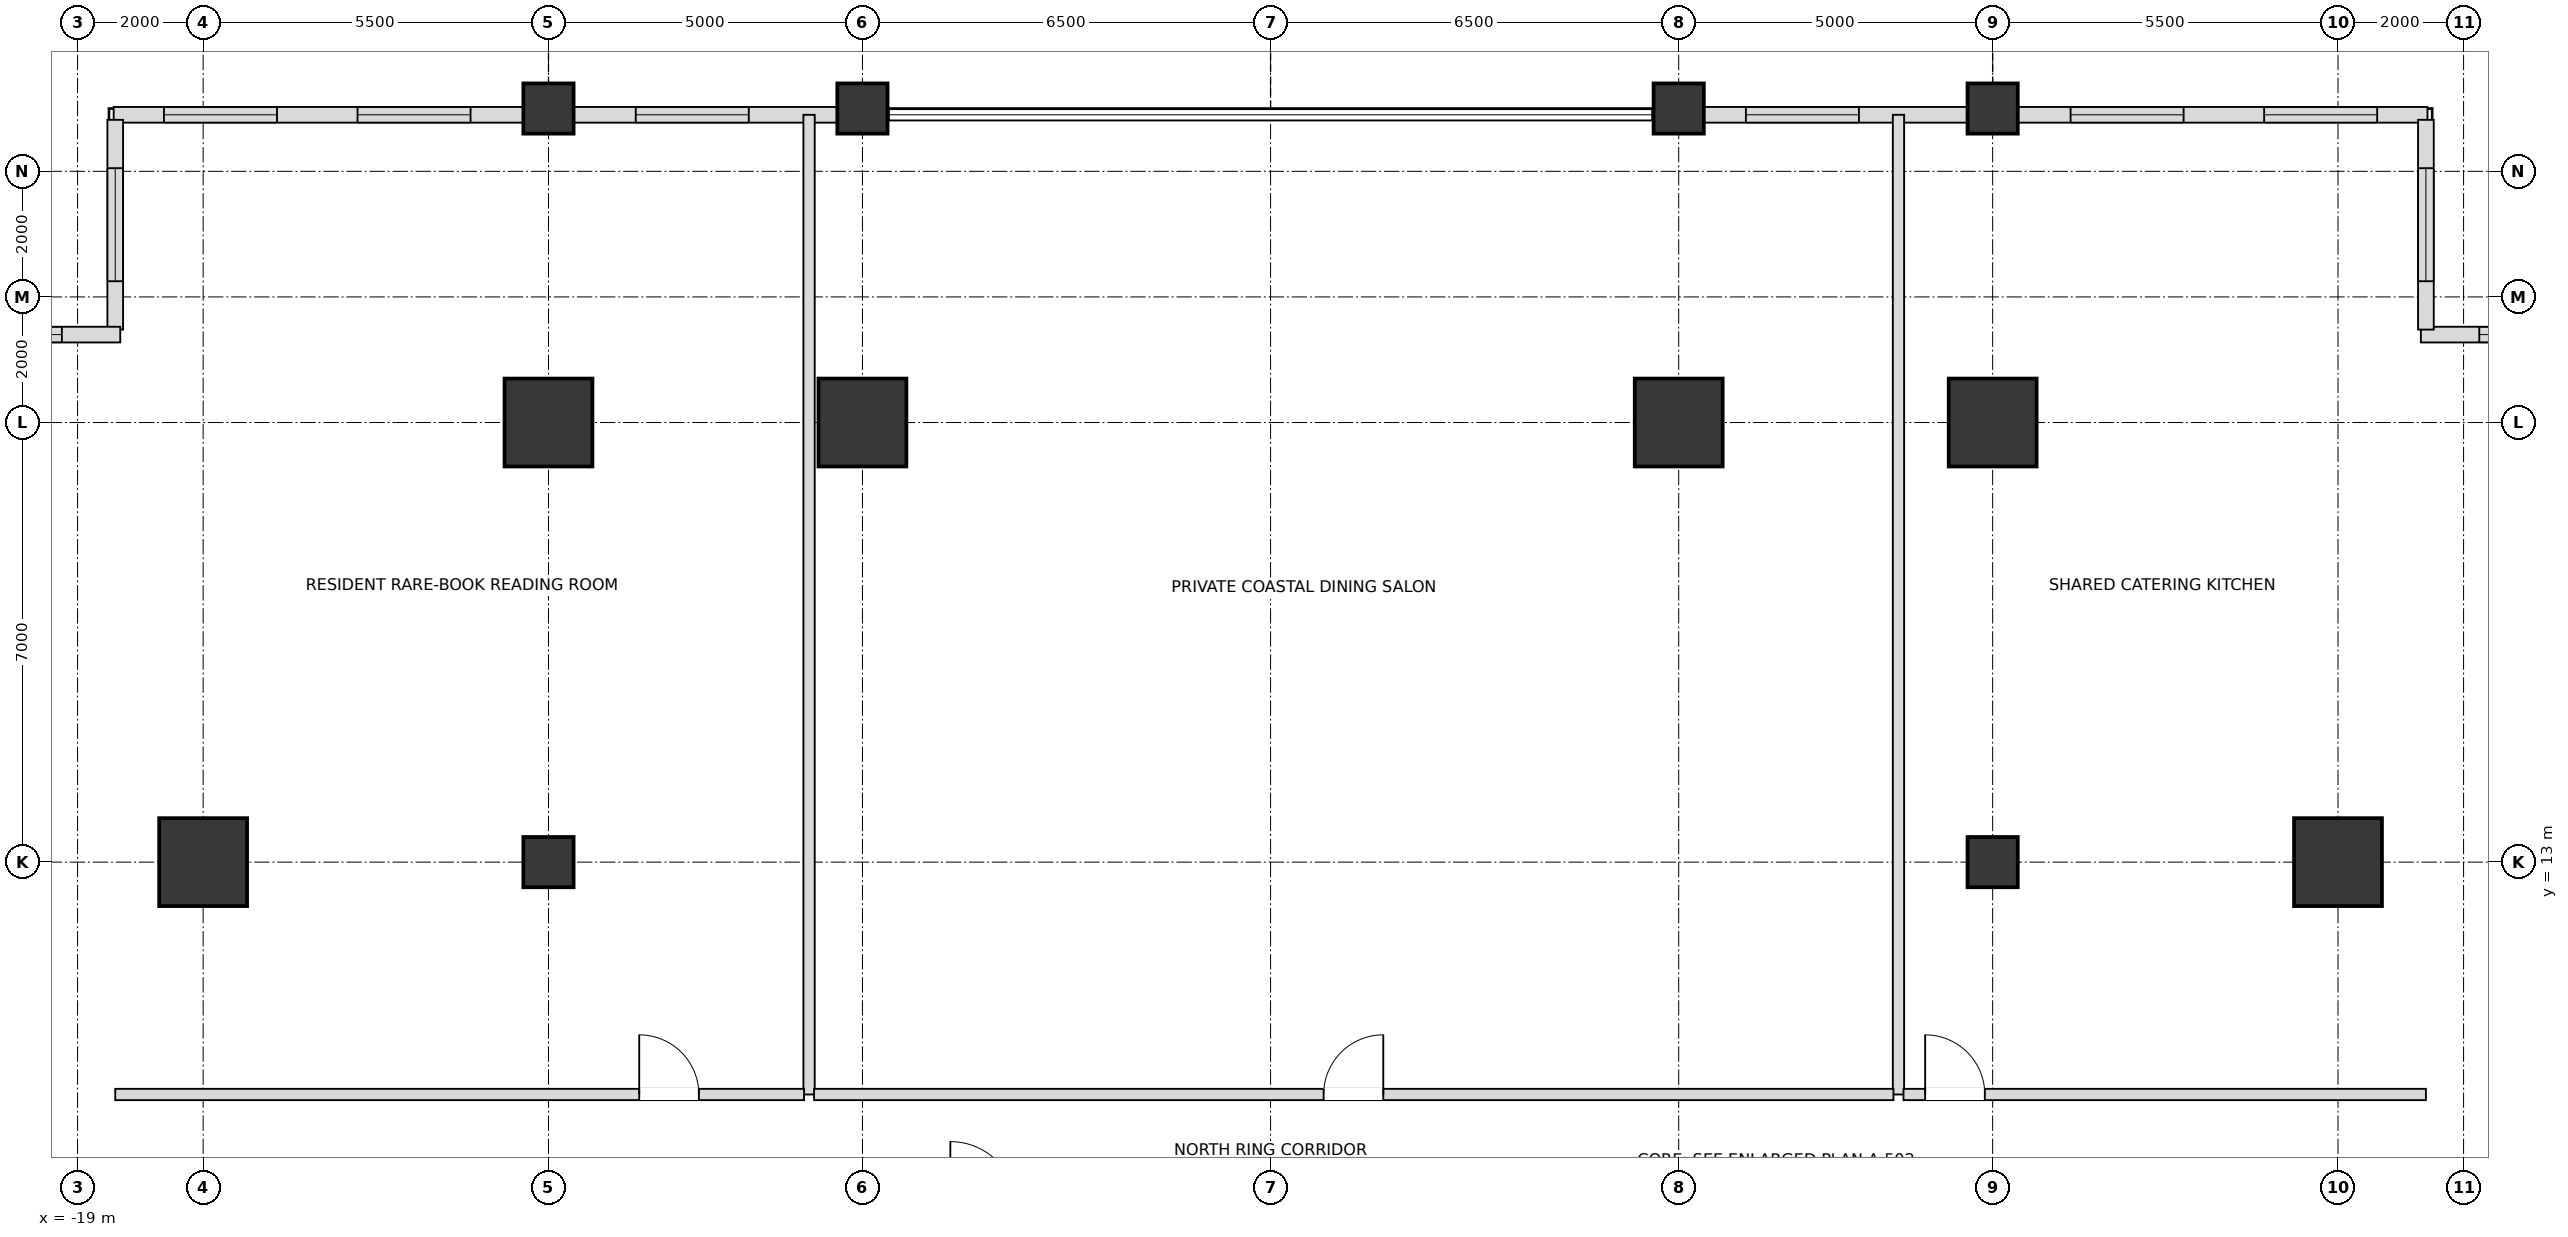
"""IFC4 building model, lengths in metres.
Left out: names, types, materials, properties, quantities, classifications, styles, units other than length and angle.
Written with IfcOpenShell. Run it as: python <this file> out.ifc"""

import sys

from ifc_helpers import new_model, si_unit, direction, frame, frame_2d, origin, origin_2d, place, context, subcontext, project, spatial, rectangle, extrude, element, fill, save


model = new_model("IFC4")
c1 = context("Model", 3, precision=1e-05, world=origin(), true_north=direction((0.0, 1.0)))
c2 = subcontext(c1, "Body", "Model", "MODEL_VIEW")
j1 = project(units=[si_unit("LENGTHUNIT", "METRE"), si_unit("PLANEANGLEUNIT", "RADIAN")], contexts=[c1])
p1 = place(None, origin())
s1 = spatial("IfcSite", under=j1, at=p1, CompositionType="ELEMENT")
p2 = place(p1, origin())
s2 = spatial("IfcBuilding", under=s1, at=p2, CompositionType="ELEMENT")
p3 = place(p2, frame((0.0, 0.0, 72.0)))
s3 = spatial("IfcBuildingStorey", under=s2, at=p3, CompositionType="ELEMENT", Elevation=72.0)
for number, where, z_axis, x_axis in (
    (1, (17.0, 13.0, 0.0), (0.0, 0.0, 1.0), (1.0, 0.0, 0.0)),
    (2, (11.5, 20.0, 0.0), (0.0, 0.0, 1.0), (1.0, 0.0, 0.0)),
    (3, (6.5, 20.0, 0.0), (0.0, 0.0, 1.0), (1.0, 0.0, 0.0)),
    (4, (-6.5, 20.0, 0.0), (0.0, 0.0, 1.0), (1.0, 0.0, 0.0)),
    (5, (-11.5, 20.0, 0.0), (0.0, 0.0, 1.0), (1.0, 0.0, 0.0)),
    (6, (-17.0, 13.0, 0.0), (0.0, 0.0, 1.0), (1.0, 0.0, 0.0)),
):
    element("IfcColumn", number, at=place(p3, frame(where, z_axis=z_axis, x_axis=x_axis)), inside=s3, PredefinedType="USERDEFINED", context=c2, shape_type="SweptSolid", body=[
        extrude(rectangle(XDim=1.4, YDim=1.4, at=origin_2d()), origin(), (0.0, 0.0, 1.0), 3.6),
    ])
for number, where, z_axis, x_axis in (
    (7, (-11.5, 13.0, 0.0), (0.0, 0.0, 1.0), (1.0, 0.0, 0.0)),
    (8, (11.5, 13.0, 0.0), (0.0, 0.0, 1.0), (1.0, 0.0, 0.0)),
    (9, (-11.5, 25.0, 0.0), (0.0, 0.0, 1.0), (1.0, 0.0, 0.0)),
    (10, (-6.5, 25.0, 0.0), (0.0, 0.0, 1.0), (1.0, 0.0, 0.0)),
    (11, (6.5, 25.0, 0.0), (0.0, 0.0, 1.0), (1.0, 0.0, 0.0)),
    (12, (11.5, 25.0, 0.0), (0.0, 0.0, 1.0), (1.0, 0.0, 0.0)),
):
    element("IfcColumn", number, at=place(p3, frame(where, z_axis=z_axis, x_axis=x_axis)), inside=s3, PredefinedType="COLUMN", context=c2, shape_type="SweptSolid", body=[
        extrude(rectangle(XDim=0.8, YDim=0.8, at=origin_2d()), origin(), (0.0, 0.0, 1.0), 3.6),
    ])
p4 = place(p3, frame((18.425, 24.9, 0.0), z_axis=(0.0, 0.0, 1.0), x_axis=(-1.0, 0.0, 0.0)))
e13 = element("IfcWall", 13, at=p4, inside=s3, PredefinedType="SOLIDWALL", context=c2, shape_type="SweptSolid", body=[
    extrude(rectangle(XDim=6.53, YDim=0.25, at=frame_2d((3.265, 0.0))), origin(), (0.0, 0.0, 1.0), 2.736),
])
p5 = place(p4, frame((0.801, 0.0, 0.72)))
e14 = element("IfcOpeningElement", 14, at=p5, cuts=e13, PredefinedType="OPENING", context=c2, shape_type="SweptSolid", body=[
    extrude(rectangle(XDim=1.8, YDim=1.68, at=frame_2d((0.9, 0.84))), frame((0.0, 0.135, 0.0), z_axis=(0.0, -1.0, 0.0), x_axis=(1.0, 0.0, 0.0)), (0.0, 0.0, 1.0), 0.27),
])
p6 = place(p4, frame((3.884, 0.0, 0.72)))
e15 = element("IfcOpeningElement", 15, at=p6, cuts=e13, PredefinedType="OPENING", context=c2, shape_type="SweptSolid", body=[
    extrude(rectangle(XDim=1.8, YDim=1.68, at=frame_2d((0.9, 0.84))), frame((0.0, 0.135, 0.0), z_axis=(0.0, -1.0, 0.0), x_axis=(1.0, 0.0, 0.0)), (0.0, 0.0, 1.0), 0.27),
])
p7 = place(p3, frame((11.105, 24.9, 0.0), z_axis=(0.0, 0.0, 1.0), x_axis=(-1.0, 0.0, 0.0)))
e16 = element("IfcWall", 16, at=p7, inside=s3, PredefinedType="SOLIDWALL", context=c2, shape_type="SweptSolid", body=[
    extrude(rectangle(XDim=4.21, YDim=0.25, at=frame_2d((2.105, 0.0))), origin(), (0.0, 0.0, 1.0), 2.736),
])
p8 = place(p7, frame((1.735, 0.0, 0.72)))
e17 = element("IfcOpeningElement", 17, at=p8, cuts=e16, PredefinedType="OPENING", context=c2, shape_type="SweptSolid", body=[
    extrude(rectangle(XDim=1.8, YDim=1.68, at=frame_2d((0.9, 0.84))), frame((0.0, 0.135, 0.0), z_axis=(0.0, -1.0, 0.0), x_axis=(1.0, 0.0, 0.0)), (0.0, 0.0, 1.0), 0.27),
])
p9 = place(p3, frame((-6.895, 24.9, 0.0), z_axis=(0.0, 0.0, 1.0), x_axis=(-1.0, 0.0, 0.0)))
e18 = element("IfcWall", 18, at=p9, inside=s3, PredefinedType="SOLIDWALL", context=c2, shape_type="SweptSolid", body=[
    extrude(rectangle(XDim=4.21, YDim=0.25, at=frame_2d((2.105, 0.0))), origin(), (0.0, 0.0, 1.0), 2.736),
])
p10 = place(p9, frame((1.415, 0.0, 0.72)))
e19 = element("IfcOpeningElement", 19, at=p10, cuts=e18, PredefinedType="OPENING", context=c2, shape_type="SweptSolid", body=[
    extrude(rectangle(XDim=1.8, YDim=1.68, at=frame_2d((0.9, 0.84))), frame((0.0, 0.135, 0.0), z_axis=(0.0, -1.0, 0.0), x_axis=(1.0, 0.0, 0.0)), (0.0, 0.0, 1.0), 0.27),
])
p11 = place(p3, frame((-11.895, 24.9, 0.0), z_axis=(0.0, 0.0, 1.0), x_axis=(-1.0, 0.0, 0.0)))
e20 = element("IfcWall", 20, at=p11, inside=s3, PredefinedType="SOLIDWALL", context=c2, shape_type="SweptSolid", body=[
    extrude(rectangle(XDim=6.53, YDim=0.25, at=frame_2d((3.265, 0.0))), origin(), (0.0, 0.0, 1.0), 2.736),
])
p12 = place(p11, frame((0.846, 0.0, 0.72)))
e21 = element("IfcOpeningElement", 21, at=p12, cuts=e20, PredefinedType="OPENING", context=c2, shape_type="SweptSolid", body=[
    extrude(rectangle(XDim=1.8, YDim=1.68, at=frame_2d((0.9, 0.84))), frame((0.0, 0.135, 0.0), z_axis=(0.0, -1.0, 0.0), x_axis=(1.0, 0.0, 0.0)), (0.0, 0.0, 1.0), 0.27),
])
p13 = place(p11, frame((3.929, 0.0, 0.72)))
e22 = element("IfcOpeningElement", 22, at=p13, cuts=e20, PredefinedType="OPENING", context=c2, shape_type="SweptSolid", body=[
    extrude(rectangle(XDim=1.8, YDim=1.68, at=frame_2d((0.9, 0.84))), frame((0.0, 0.135, 0.0), z_axis=(0.0, -1.0, 0.0), x_axis=(1.0, 0.0, 0.0)), (0.0, 0.0, 1.0), 0.27),
])
p14 = place(p3, frame((21.98, 21.4, 0.0), z_axis=(0.0, 0.0, 1.0), x_axis=(-1.0, 0.0, 0.0)))
e23 = element("IfcWall", 23, at=p14, inside=s3, PredefinedType="SOLIDWALL", context=c2, shape_type="SweptSolid", body=[
    extrude(rectangle(XDim=3.66, YDim=0.25, at=frame_2d((1.83, 0.0))), origin(), (0.0, 0.0, 1.0), 2.736),
])
p15 = place(p14, frame((0.93, 0.0, 0.72)))
e24 = element("IfcOpeningElement", 24, at=p15, cuts=e23, PredefinedType="OPENING", context=c2, shape_type="SweptSolid", body=[
    extrude(rectangle(XDim=1.8, YDim=1.68, at=frame_2d((0.9, 0.84))), frame((0.0, 0.135, 0.0), z_axis=(0.0, -1.0, 0.0), x_axis=(1.0, 0.0, 0.0)), (0.0, 0.0, 1.0), 0.27),
])
p16 = place(p3, frame((18.4, 21.48, 0.0), z_axis=(0.0, 0.0, 1.0), x_axis=(0.0, 1.0, 0.0)))
e25 = element("IfcWall", 25, at=p16, inside=s3, PredefinedType="SOLIDWALL", context=c2, shape_type="SweptSolid", body=[
    extrude(rectangle(XDim=3.34, YDim=0.25, at=frame_2d((1.67, 0.0))), origin(), (0.0, 0.0, 1.0), 2.736),
])
p17 = place(p16, frame((0.77, 0.0, 0.72)))
e26 = element("IfcOpeningElement", 26, at=p17, cuts=e25, PredefinedType="OPENING", context=c2, shape_type="SweptSolid", body=[
    extrude(rectangle(XDim=1.8, YDim=1.68, at=frame_2d((0.9, 0.84))), frame((0.0, 0.135, 0.0), z_axis=(0.0, -1.0, 0.0), x_axis=(1.0, 0.0, 0.0)), (0.0, 0.0, 1.0), 0.27),
])
p18 = place(p3, frame((-18.4, 24.82, 0.0), z_axis=(0.0, 0.0, 1.0), x_axis=(0.0, -1.0, 0.0)))
e27 = element("IfcWall", 27, at=p18, inside=s3, PredefinedType="SOLIDWALL", context=c2, shape_type="SweptSolid", body=[
    extrude(rectangle(XDim=3.34, YDim=0.25, at=frame_2d((1.67, 0.0))), origin(), (0.0, 0.0, 1.0), 2.736),
])
p19 = place(p18, frame((0.77, 0.0, 0.72)))
e28 = element("IfcOpeningElement", 28, at=p19, cuts=e27, PredefinedType="OPENING", context=c2, shape_type="SweptSolid", body=[
    extrude(rectangle(XDim=1.8, YDim=1.68, at=frame_2d((0.9, 0.84))), frame((0.0, 0.135, 0.0), z_axis=(0.0, -1.0, 0.0), x_axis=(1.0, 0.0, 0.0)), (0.0, 0.0, 1.0), 0.27),
])
p20 = place(p3, frame((-18.32, 21.4, 0.0), z_axis=(0.0, 0.0, 1.0), x_axis=(-1.0, 0.0, 0.0)))
e29 = element("IfcWall", 29, at=p20, inside=s3, PredefinedType="SOLIDWALL", context=c2, shape_type="SweptSolid", body=[
    extrude(rectangle(XDim=3.66, YDim=0.25, at=frame_2d((1.83, 0.0))), origin(), (0.0, 0.0, 1.0), 2.736),
])
p21 = place(p20, frame((0.93, 0.0, 0.72)))
e30 = element("IfcOpeningElement", 30, at=p21, cuts=e29, PredefinedType="OPENING", context=c2, shape_type="SweptSolid", body=[
    extrude(rectangle(XDim=1.8, YDim=1.68, at=frame_2d((0.9, 0.84))), frame((0.0, 0.135, 0.0), z_axis=(0.0, -1.0, 0.0), x_axis=(1.0, 0.0, 0.0)), (0.0, 0.0, 1.0), 0.27),
])
for number, where, z_axis, x_axis in (
    (31, (-7.35, 9.3, 0.0), (0.0, 0.0, 1.0), (0.0, 1.0, 0.0)),
    (32, (10.0, 9.3, 0.0), (0.0, 0.0, 1.0), (0.0, 1.0, 0.0)),
):
    element("IfcWall", number, at=place(p3, frame(where, z_axis=z_axis, x_axis=x_axis)), inside=s3, PredefinedType="PARTITIONING", context=c2, shape_type="SweptSolid", body=[
        extrude(rectangle(XDim=15.6, YDim=0.18, at=frame_2d((7.8, 0.0))), origin(), (0.0, 0.0, 1.0), 2.816),
    ])
p22 = place(p3, frame((-18.4, 9.3, 0.0), z_axis=(0.0, 0.0, 1.0), x_axis=(1.0, 0.0, 0.0)))
e33 = element("IfcWall", 33, at=p22, inside=s3, PredefinedType="PARTITIONING", context=c2, shape_type="SweptSolid", body=[
    extrude(rectangle(XDim=10.97, YDim=0.18, at=frame_2d((5.485, 0.0))), origin(), (0.0, 0.0, 1.0), 2.816),
])
p23 = place(p22, frame((8.345, 0.0, 0.0)))
e34 = element("IfcOpeningElement", 34, at=p23, cuts=e33, PredefinedType="OPENING", context=c2, shape_type="SweptSolid", body=[
    extrude(rectangle(XDim=0.95, YDim=2.15, at=frame_2d((0.475, 1.075))), frame((0.0, 0.1, 0.0), z_axis=(0.0, -1.0, 0.0), x_axis=(1.0, 0.0, 0.0)), (0.0, 0.0, 1.0), 0.2),
])
p24 = place(p3, frame((-7.27, 9.3, 0.0), z_axis=(0.0, 0.0, 1.0), x_axis=(1.0, 0.0, 0.0)))
e35 = element("IfcWall", 35, at=p24, inside=s3, PredefinedType="PARTITIONING", context=c2, shape_type="SweptSolid", body=[
    extrude(rectangle(XDim=17.19, YDim=0.18, at=frame_2d((8.595, 0.0))), origin(), (0.0, 0.0, 1.0), 2.816),
])
p25 = place(p24, frame((8.115, 0.0, 0.0)))
e36 = element("IfcOpeningElement", 36, at=p25, cuts=e35, PredefinedType="OPENING", context=c2, shape_type="SweptSolid", body=[
    extrude(rectangle(XDim=0.95, YDim=2.15, at=frame_2d((0.475, 1.075))), frame((0.0, 0.1, 0.0), z_axis=(0.0, -1.0, 0.0), x_axis=(1.0, 0.0, 0.0)), (0.0, 0.0, 1.0), 0.2),
])
p26 = place(p3, frame((10.08, 9.3, 0.0), z_axis=(0.0, 0.0, 1.0), x_axis=(1.0, 0.0, 0.0)))
e37 = element("IfcWall", 37, at=p26, inside=s3, PredefinedType="PARTITIONING", context=c2, shape_type="SweptSolid", body=[
    extrude(rectangle(XDim=8.32, YDim=0.18, at=frame_2d((4.16, 0.0))), origin(), (0.0, 0.0, 1.0), 2.816),
])
p27 = place(p26, frame((0.345, 0.0, 0.0)))
e38 = element("IfcOpeningElement", 38, at=p27, cuts=e37, PredefinedType="OPENING", context=c2, shape_type="SweptSolid", body=[
    extrude(rectangle(XDim=0.95, YDim=2.15, at=frame_2d((0.475, 1.075))), frame((0.0, 0.1, 0.0), z_axis=(0.0, -1.0, 0.0), x_axis=(1.0, 0.0, 0.0)), (0.0, 0.0, 1.0), 0.2),
])
p28 = place(p5, origin())
e39 = element("IfcWindow", 39, at=p28, inside=s3, PartitioningType="SINGLE_PANEL", PredefinedType="WINDOW", context=c2, shape_type="SweptSolid", body=[
    extrude(rectangle(XDim=1.8, YDim=1.68, at=frame_2d((0.9, 0.84))), frame((0.0, 0.03, 0.0), z_axis=(0.0, -1.0, 0.0), x_axis=(1.0, 0.0, 0.0)), (0.0, 0.0, 1.0), 0.06),
])
fill(e14, e39)
p29 = place(p6, origin())
e40 = element("IfcWindow", 40, at=p29, inside=s3, PartitioningType="SINGLE_PANEL", PredefinedType="WINDOW", context=c2, shape_type="SweptSolid", body=[
    extrude(rectangle(XDim=1.8, YDim=1.68, at=frame_2d((0.9, 0.84))), frame((0.0, 0.03, 0.0), z_axis=(0.0, -1.0, 0.0), x_axis=(1.0, 0.0, 0.0)), (0.0, 0.0, 1.0), 0.06),
])
fill(e15, e40)
p30 = place(p8, origin())
e41 = element("IfcWindow", 41, at=p30, inside=s3, PartitioningType="SINGLE_PANEL", PredefinedType="WINDOW", context=c2, shape_type="SweptSolid", body=[
    extrude(rectangle(XDim=1.8, YDim=1.68, at=frame_2d((0.9, 0.84))), frame((0.0, 0.03, 0.0), z_axis=(0.0, -1.0, 0.0), x_axis=(1.0, 0.0, 0.0)), (0.0, 0.0, 1.0), 0.06),
])
fill(e17, e41)
p31 = place(p10, origin())
e42 = element("IfcWindow", 42, at=p31, inside=s3, PartitioningType="SINGLE_PANEL", PredefinedType="WINDOW", context=c2, shape_type="SweptSolid", body=[
    extrude(rectangle(XDim=1.8, YDim=1.68, at=frame_2d((0.9, 0.84))), frame((0.0, 0.03, 0.0), z_axis=(0.0, -1.0, 0.0), x_axis=(1.0, 0.0, 0.0)), (0.0, 0.0, 1.0), 0.06),
])
fill(e19, e42)
p32 = place(p12, origin())
e43 = element("IfcWindow", 43, at=p32, inside=s3, PartitioningType="SINGLE_PANEL", PredefinedType="WINDOW", context=c2, shape_type="SweptSolid", body=[
    extrude(rectangle(XDim=1.8, YDim=1.68, at=frame_2d((0.9, 0.84))), frame((0.0, 0.03, 0.0), z_axis=(0.0, -1.0, 0.0), x_axis=(1.0, 0.0, 0.0)), (0.0, 0.0, 1.0), 0.06),
])
fill(e21, e43)
p33 = place(p13, origin())
e44 = element("IfcWindow", 44, at=p33, inside=s3, PartitioningType="SINGLE_PANEL", PredefinedType="WINDOW", context=c2, shape_type="SweptSolid", body=[
    extrude(rectangle(XDim=1.8, YDim=1.68, at=frame_2d((0.9, 0.84))), frame((0.0, 0.03, 0.0), z_axis=(0.0, -1.0, 0.0), x_axis=(1.0, 0.0, 0.0)), (0.0, 0.0, 1.0), 0.06),
])
fill(e22, e44)
p34 = place(p15, origin())
e45 = element("IfcWindow", 45, at=p34, inside=s3, PartitioningType="SINGLE_PANEL", PredefinedType="WINDOW", context=c2, shape_type="SweptSolid", body=[
    extrude(rectangle(XDim=1.8, YDim=1.68, at=frame_2d((0.9, 0.84))), frame((0.0, 0.03, 0.0), z_axis=(0.0, -1.0, 0.0), x_axis=(1.0, 0.0, 0.0)), (0.0, 0.0, 1.0), 0.06),
])
fill(e24, e45)
p35 = place(p17, origin())
e46 = element("IfcWindow", 46, at=p35, inside=s3, PartitioningType="SINGLE_PANEL", PredefinedType="WINDOW", context=c2, shape_type="SweptSolid", body=[
    extrude(rectangle(XDim=1.8, YDim=1.68, at=frame_2d((0.9, 0.84))), frame((0.0, 0.03, 0.0), z_axis=(0.0, -1.0, 0.0), x_axis=(1.0, 0.0, 0.0)), (0.0, 0.0, 1.0), 0.06),
])
fill(e26, e46)
p36 = place(p19, origin())
e47 = element("IfcWindow", 47, at=p36, inside=s3, PartitioningType="SINGLE_PANEL", PredefinedType="WINDOW", context=c2, shape_type="SweptSolid", body=[
    extrude(rectangle(XDim=1.8, YDim=1.68, at=frame_2d((0.9, 0.84))), frame((0.0, 0.03, 0.0), z_axis=(0.0, -1.0, 0.0), x_axis=(1.0, 0.0, 0.0)), (0.0, 0.0, 1.0), 0.06),
])
fill(e28, e47)
p37 = place(p21, origin())
e48 = element("IfcWindow", 48, at=p37, inside=s3, PartitioningType="SINGLE_PANEL", PredefinedType="WINDOW", context=c2, shape_type="SweptSolid", body=[
    extrude(rectangle(XDim=1.8, YDim=1.68, at=frame_2d((0.9, 0.84))), frame((0.0, 0.03, 0.0), z_axis=(0.0, -1.0, 0.0), x_axis=(1.0, 0.0, 0.0)), (0.0, 0.0, 1.0), 0.06),
])
fill(e30, e48)
p38 = place(p23, origin())
e49 = element("IfcDoor", 49, at=p38, inside=s3, OperationType="SINGLE_SWING_LEFT", PredefinedType="DOOR", context=c2, shape_type="SweptSolid", body=[
    extrude(rectangle(XDim=0.95, YDim=2.15, at=frame_2d((0.475, 1.075))), frame((0.0, 0.025, 0.0), z_axis=(0.0, -1.0, 0.0), x_axis=(1.0, 0.0, 0.0)), (0.0, 0.0, 1.0), 0.05),
])
fill(e34, e49)
p39 = place(p25, origin())
e50 = element("IfcDoor", 50, at=p39, inside=s3, OperationType="SINGLE_SWING_RIGHT", PredefinedType="DOOR", context=c2, shape_type="SweptSolid", body=[
    extrude(rectangle(XDim=0.95, YDim=2.15, at=frame_2d((0.475, 1.075))), frame((0.0, 0.025, 0.0), z_axis=(0.0, -1.0, 0.0), x_axis=(1.0, 0.0, 0.0)), (0.0, 0.0, 1.0), 0.05),
])
fill(e36, e50)
p40 = place(p27, origin())
e51 = element("IfcDoor", 51, at=p40, inside=s3, OperationType="SINGLE_SWING_LEFT", PredefinedType="DOOR", context=c2, shape_type="SweptSolid", body=[
    extrude(rectangle(XDim=0.95, YDim=2.15, at=frame_2d((0.475, 1.075))), frame((0.0, 0.025, 0.0), z_axis=(0.0, -1.0, 0.0), x_axis=(1.0, 0.0, 0.0)), (0.0, 0.0, 1.0), 0.05),
])
fill(e38, e51)
save(model, sys.argv[1])
